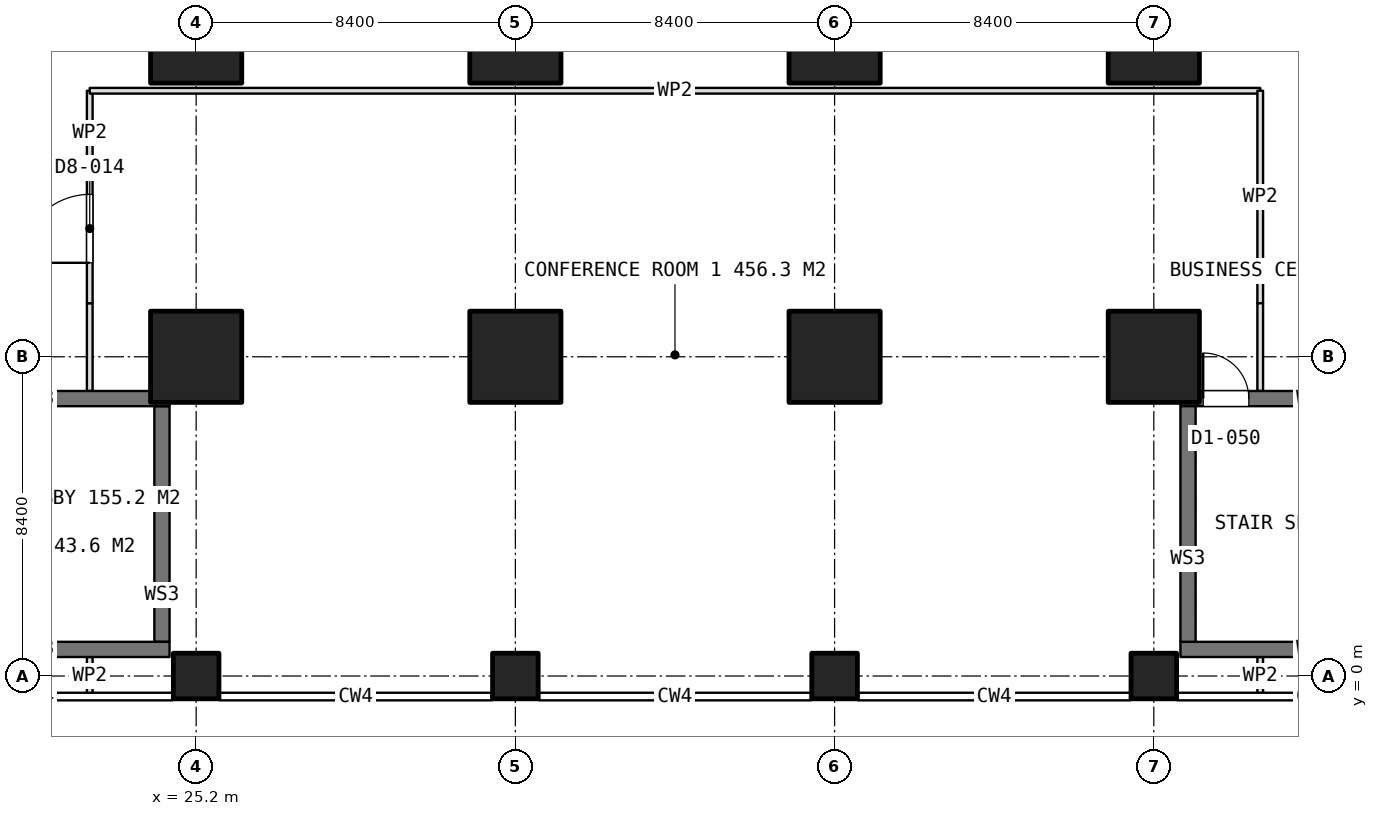
"""IFC4 building model, lengths in metres.
Left out: names, types, materials, properties, quantities, classifications, styles, units other than length and angle.
Written with IfcOpenShell. Run it as: python <this file> out.ifc"""

import sys

from ifc_helpers import new_model, si_unit, direction, frame, frame_2d, origin, origin_2d, place, context, subcontext, project, spatial, rectangle, extrude, element, fill, save


model = new_model("IFC4")
c1 = context("Model", 3, precision=1e-05, world=origin(), true_north=direction((0.0, 1.0)))
c2 = subcontext(c1, "Body", "Model", "MODEL_VIEW")
j1 = project(units=[si_unit("LENGTHUNIT", "METRE"), si_unit("PLANEANGLEUNIT", "RADIAN")], contexts=[c1])
p1 = place(None, origin())
s1 = spatial("IfcSite", under=j1, at=p1, CompositionType="ELEMENT")
p2 = place(p1, origin())
s2 = spatial("IfcBuilding", under=s1, at=p2, CompositionType="ELEMENT")
p3 = place(p2, frame((0.0, 0.0, 20.4)))
s3 = spatial("IfcBuildingStorey", under=s2, at=p3, CompositionType="ELEMENT", Elevation=20.4)
p4 = place(p3, frame((25.2, 0.0, 0.0), z_axis=(0.0, 0.0, 1.0), x_axis=(1.0, 0.0, 0.0)))
e1 = element("IfcColumn", 1, at=p4, inside=s3, PredefinedType="COLUMN", context=c2, shape_type="SweptSolid", body=[
    extrude(rectangle(XDim=1.2, YDim=1.2, at=origin_2d()), origin(), (0.0, 0.0, 1.0), 5.0),
])
for number, where, z_axis, x_axis in (
    (2, (25.2, 8.4, 0.0), (0.0, 0.0, 1.0), (1.0, 0.0, 0.0)),
    (3, (25.2, 16.8, 0.0), (0.0, 0.0, 1.0), (1.0, 0.0, 0.0)),
):
    element("IfcColumn", number, at=place(p3, frame(where, z_axis=z_axis, x_axis=x_axis)), inside=s3, PredefinedType="COLUMN", context=c2, shape_type="SweptSolid", body=[
        extrude(rectangle(XDim=2.4, YDim=2.4, at=origin_2d()), origin(), (0.0, 0.0, 1.0), 5.0),
    ])
p5 = place(p3, frame((33.6, 0.0, 0.0), z_axis=(0.0, 0.0, 1.0), x_axis=(1.0, 0.0, 0.0)))
e4 = element("IfcColumn", 4, at=p5, inside=s3, PredefinedType="COLUMN", context=c2, shape_type="SweptSolid", body=[
    extrude(rectangle(XDim=1.2, YDim=1.2, at=origin_2d()), origin(), (0.0, 0.0, 1.0), 5.0),
])
for number, where, z_axis, x_axis in (
    (5, (33.6, 8.4, 0.0), (0.0, 0.0, 1.0), (1.0, 0.0, 0.0)),
    (6, (33.6, 16.8, 0.0), (0.0, 0.0, 1.0), (1.0, 0.0, 0.0)),
):
    element("IfcColumn", number, at=place(p3, frame(where, z_axis=z_axis, x_axis=x_axis)), inside=s3, PredefinedType="COLUMN", context=c2, shape_type="SweptSolid", body=[
        extrude(rectangle(XDim=2.4, YDim=2.4, at=origin_2d()), origin(), (0.0, 0.0, 1.0), 5.0),
    ])
p6 = place(p3, frame((42.0, 0.0, 0.0), z_axis=(0.0, 0.0, 1.0), x_axis=(1.0, 0.0, 0.0)))
e7 = element("IfcColumn", 7, at=p6, inside=s3, PredefinedType="COLUMN", context=c2, shape_type="SweptSolid", body=[
    extrude(rectangle(XDim=1.2, YDim=1.2, at=origin_2d()), origin(), (0.0, 0.0, 1.0), 5.0),
])
for number, where, z_axis, x_axis in (
    (8, (42.0, 8.4, 0.0), (0.0, 0.0, 1.0), (1.0, 0.0, 0.0)),
    (9, (42.0, 16.8, 0.0), (0.0, 0.0, 1.0), (1.0, 0.0, 0.0)),
):
    element("IfcColumn", number, at=place(p3, frame(where, z_axis=z_axis, x_axis=x_axis)), inside=s3, PredefinedType="COLUMN", context=c2, shape_type="SweptSolid", body=[
        extrude(rectangle(XDim=2.4, YDim=2.4, at=origin_2d()), origin(), (0.0, 0.0, 1.0), 5.0),
    ])
p7 = place(p3, frame((50.4, 0.0, 0.0), z_axis=(0.0, 0.0, 1.0), x_axis=(1.0, 0.0, 0.0)))
e10 = element("IfcColumn", 10, at=p7, inside=s3, PredefinedType="COLUMN", context=c2, shape_type="SweptSolid", body=[
    extrude(rectangle(XDim=1.2, YDim=1.2, at=origin_2d()), origin(), (0.0, 0.0, 1.0), 5.0),
])
for number, where, z_axis, x_axis in (
    (11, (50.4, 8.4, 0.0), (0.0, 0.0, 1.0), (1.0, 0.0, 0.0)),
    (12, (50.4, 16.8, 0.0), (0.0, 0.0, 1.0), (1.0, 0.0, 0.0)),
):
    element("IfcColumn", number, at=place(p3, frame(where, z_axis=z_axis, x_axis=x_axis)), inside=s3, PredefinedType="COLUMN", context=c2, shape_type="SweptSolid", body=[
        extrude(rectangle(XDim=2.4, YDim=2.4, at=origin_2d()), origin(), (0.0, 0.0, 1.0), 5.0),
    ])
p8 = place(p3, frame((17.5, 0.7, 0.0), z_axis=(0.0, 0.0, 1.0), x_axis=(1.0, 0.0, 0.0)))
e13 = element("IfcWall", 13, at=p8, inside=s3, PredefinedType="SOLIDWALL", context=c2, shape_type="SweptSolid", body=[
    extrude(rectangle(XDim=7.0, YDim=0.4, at=frame_2d((3.5, 0.0))), origin(), (0.0, 0.0, 1.0), 2.8),
])
p9 = place(p3, frame((17.5, 7.3, 0.0), z_axis=(0.0, 0.0, 1.0), x_axis=(1.0, 0.0, 0.0)))
e14 = element("IfcWall", 14, at=p9, inside=s3, PredefinedType="SOLIDWALL", context=c2, shape_type="SweptSolid", body=[
    extrude(rectangle(XDim=7.0, YDim=0.4, at=frame_2d((3.5, 0.0))), origin(), (0.0, 0.0, 1.0), 2.8),
])
p10 = place(p9, frame((0.6, 0.0, 0.0)))
e15 = element("IfcOpeningElement", 15, at=p10, cuts=e14, PredefinedType="OPENING", context=c2, shape_type="SweptSolid", body=[
    extrude(rectangle(XDim=1.2, YDim=2.1, at=frame_2d((0.6, 1.05))), frame((0.0, 0.21, 0.0), z_axis=(0.0, -1.0, 0.0), x_axis=(1.0, 0.0, 0.0)), (0.0, 0.0, 1.0), 0.42),
])
p11 = place(p3, frame((24.3, 0.9, 0.0), z_axis=(0.0, 0.0, 1.0), x_axis=(0.0, 1.0, 0.0)))
e16 = element("IfcWall", 16, at=p11, inside=s3, PredefinedType="SOLIDWALL", context=c2, shape_type="SweptSolid", body=[
    extrude(rectangle(XDim=6.2, YDim=0.4, at=frame_2d((3.1, 0.0))), origin(), (0.0, 0.0, 1.0), 2.8),
])
p12 = place(p3, frame((51.1, 0.7, 0.0), z_axis=(0.0, 0.0, 1.0), x_axis=(1.0, 0.0, 0.0)))
e17 = element("IfcWall", 17, at=p12, inside=s3, PredefinedType="SOLIDWALL", context=c2, shape_type="SweptSolid", body=[
    extrude(rectangle(XDim=7.0, YDim=0.4, at=frame_2d((3.5, 0.0))), origin(), (0.0, 0.0, 1.0), 2.8),
])
p13 = place(p3, frame((51.1, 7.3, 0.0), z_axis=(0.0, 0.0, 1.0), x_axis=(1.0, 0.0, 0.0)))
e18 = element("IfcWall", 18, at=p13, inside=s3, PredefinedType="SOLIDWALL", context=c2, shape_type="SweptSolid", body=[
    extrude(rectangle(XDim=7.0, YDim=0.4, at=frame_2d((3.5, 0.0))), origin(), (0.0, 0.0, 1.0), 2.8),
])
p14 = place(p13, frame((0.6, 0.0, 0.0)))
e19 = element("IfcOpeningElement", 19, at=p14, cuts=e18, PredefinedType="OPENING", context=c2, shape_type="SweptSolid", body=[
    extrude(rectangle(XDim=1.2, YDim=2.1, at=frame_2d((0.6, 1.05))), frame((0.0, 0.21, 0.0), z_axis=(0.0, -1.0, 0.0), x_axis=(1.0, 0.0, 0.0)), (0.0, 0.0, 1.0), 0.42),
])
p15 = place(p3, frame((51.3, 0.9, 0.0), z_axis=(0.0, 0.0, 1.0), x_axis=(0.0, 1.0, 0.0)))
e20 = element("IfcWall", 20, at=p15, inside=s3, PredefinedType="SOLIDWALL", context=c2, shape_type="SweptSolid", body=[
    extrude(rectangle(XDim=6.2, YDim=0.4, at=frame_2d((3.1, 0.0))), origin(), (0.0, 0.0, 1.0), 2.8),
])
p16 = place(p3, frame((22.4, 7.5, 0.0), z_axis=(0.0, 0.0, 1.0), x_axis=(0.0, 1.0, 0.0)))
e21 = element("IfcWall", 21, at=p16, inside=s3, PredefinedType="PARTITIONING", context=c2, shape_type="SweptSolid", body=[
    extrude(rectangle(XDim=2.31, YDim=0.15, at=frame_2d((1.155, 0.0))), origin(), (0.0, 0.0, 1.0), 2.8),
])
p17 = place(p3, frame((22.4, 9.81, 0.0), z_axis=(0.0, 0.0, 1.0), x_axis=(0.0, 1.0, 0.0)))
e22 = element("IfcWall", 22, at=p17, inside=s3, PredefinedType="PARTITIONING", context=c2, shape_type="SweptSolid", body=[
    extrude(rectangle(XDim=5.59, YDim=0.15, at=frame_2d((2.795, 0.0))), origin(), (0.0, 0.0, 1.0), 2.8),
])
p18 = place(p17, frame((1.063, 0.0, 0.0)))
e23 = element("IfcOpeningElement", 23, at=p18, cuts=e22, PredefinedType="OPENING", context=c2, shape_type="SweptSolid", body=[
    extrude(rectangle(XDim=1.8, YDim=2.1, at=frame_2d((0.9, 1.05))), frame((0.0, 0.085, 0.0), z_axis=(0.0, -1.0, 0.0), x_axis=(1.0, 0.0, 0.0)), (0.0, 0.0, 1.0), 0.17),
])
p19 = place(p3, frame((22.4, 15.4, 0.0), z_axis=(0.0, 0.0, 1.0), x_axis=(1.0, 0.0, 0.0)))
e24 = element("IfcWall", 24, at=p19, inside=s3, PredefinedType="PARTITIONING", context=c2, shape_type="SweptSolid", body=[
    extrude(rectangle(XDim=30.8, YDim=0.15, at=frame_2d((15.4, 0.0))), origin(), (0.0, 0.0, 1.0), 2.8),
])
p20 = place(p3, frame((53.2, 15.4, 0.0), z_axis=(0.0, 0.0, 1.0), x_axis=(0.0, -1.0, 0.0)))
e25 = element("IfcWall", 25, at=p20, inside=s3, PredefinedType="PARTITIONING", context=c2, shape_type="SweptSolid", body=[
    extrude(rectangle(XDim=5.59, YDim=0.15, at=frame_2d((2.795, 0.0))), origin(), (0.0, 0.0, 1.0), 2.8),
])
p21 = place(p3, frame((53.2, 9.81, 0.0), z_axis=(0.0, 0.0, 1.0), x_axis=(0.0, -1.0, 0.0)))
e26 = element("IfcWall", 26, at=p21, inside=s3, PredefinedType="PARTITIONING", context=c2, shape_type="SweptSolid", body=[
    extrude(rectangle(XDim=2.31, YDim=0.15, at=frame_2d((1.155, 0.0))), origin(), (0.0, 0.0, 1.0), 2.8),
])
for number, where, z_axis, x_axis in (
    (27, (53.2, 0.5, 0.0), (0.0, 0.0, 1.0), (0.0, -1.0, 0.0)),
    (28, (22.4, -0.49, 0.0), (0.0, 0.0, 1.0), (0.0, 1.0, 0.0)),
):
    element("IfcWall", number, at=place(p3, frame(where, z_axis=z_axis, x_axis=x_axis)), inside=s3, PredefinedType="PARTITIONING", context=c2, shape_type="SweptSolid", body=[
        extrude(rectangle(XDim=0.99, YDim=0.15, at=frame_2d((0.495, 0.0))), origin(), (0.0, 0.0, 1.0), 2.8),
    ])
p22 = place(p18, origin())
e29 = element("IfcDoor", 29, at=p22, inside=s3, OperationType="DOUBLE_DOOR_SINGLE_SWING", PredefinedType="DOOR", context=c2, shape_type="SweptSolid", body=[
    extrude(rectangle(XDim=1.8, YDim=2.1, at=frame_2d((0.9, 1.05))), frame((0.0, 0.025, 0.0), z_axis=(0.0, -1.0, 0.0), x_axis=(1.0, 0.0, 0.0)), (0.0, 0.0, 1.0), 0.05),
])
fill(e23, e29)
p23 = place(p14, origin())
e30 = element("IfcDoor", 30, at=p23, inside=s3, OperationType="SINGLE_SWING_RIGHT", PredefinedType="DOOR", context=c2, shape_type="SweptSolid", body=[
    extrude(rectangle(XDim=1.2, YDim=2.1, at=frame_2d((0.6, 1.05))), frame((0.0, 0.025, 0.0), z_axis=(0.0, -1.0, 0.0), x_axis=(1.0, 0.0, 0.0)), (0.0, 0.0, 1.0), 0.05),
])
fill(e19, e30)
save(model, sys.argv[1])
